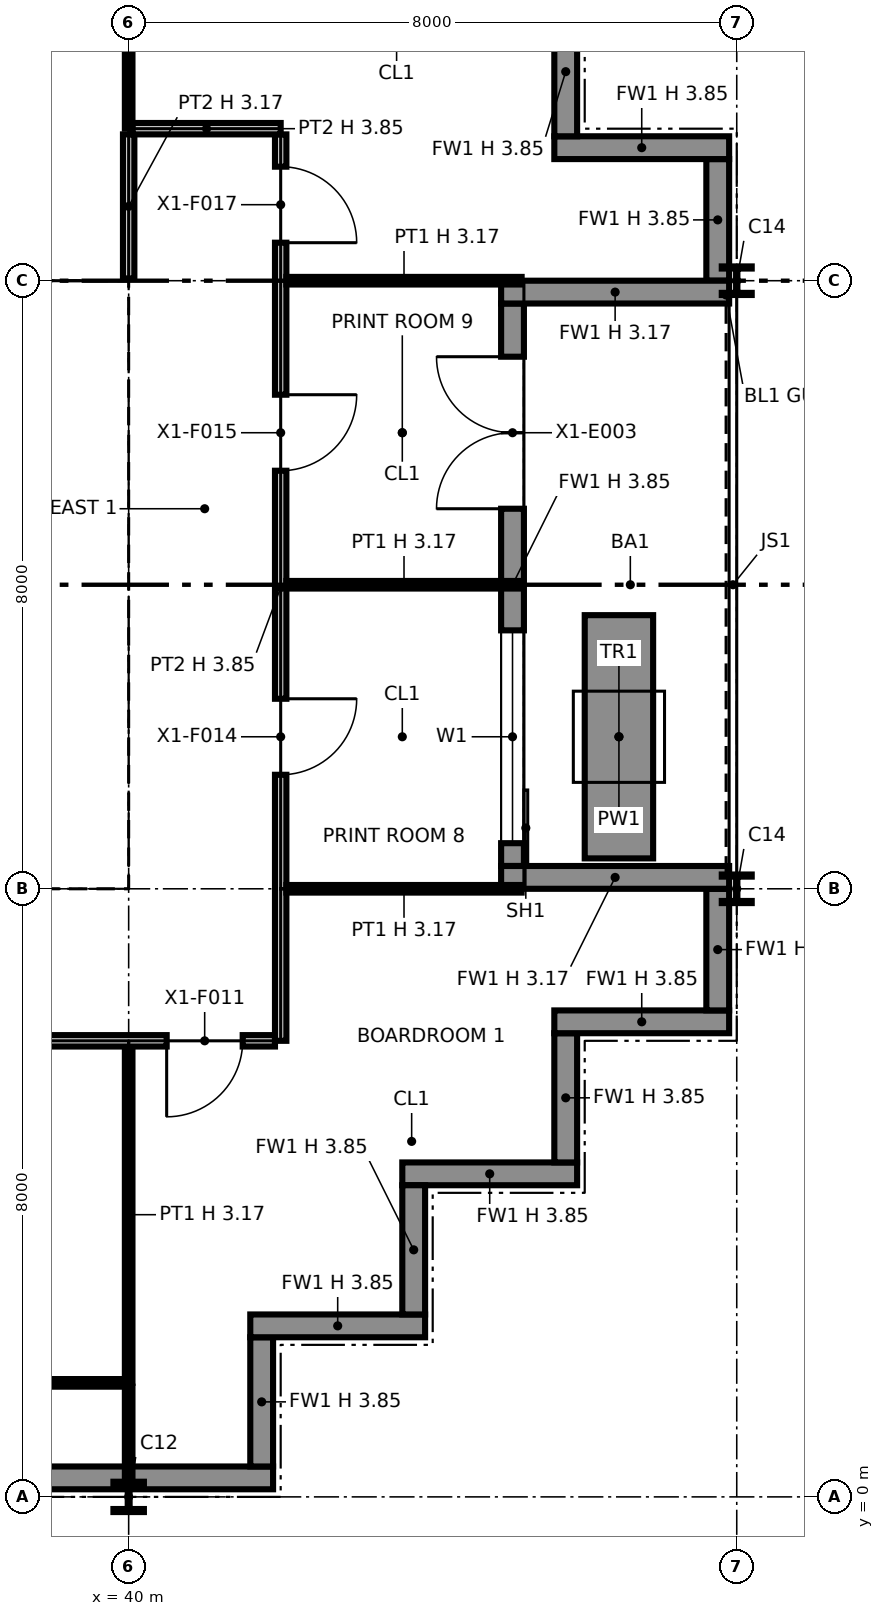
"""IFC4 building model, lengths in metres.
Left out: names, types, materials, properties, quantities, classifications, styles, units other than length and angle.
Written with IfcOpenShell. Run it as: python <this file> out.ifc"""

import sys

from ifc_helpers import new_model, si_unit, direction, frame, frame_2d, origin, origin_2d, place, context, subcontext, project, spatial, polyline, rectangle, i_section, outline, extrude, element, fill, save


model = new_model("IFC4")
c1 = context("Model", 3, precision=1e-05, world=origin(), true_north=direction((0.0, 1.0)))
c2 = subcontext(c1, "Body", "Model", "MODEL_VIEW")
j1 = project(units=[si_unit("LENGTHUNIT", "METRE"), si_unit("PLANEANGLEUNIT", "RADIAN")], contexts=[c1])
p1 = place(None, origin())
s1 = spatial("IfcSite", under=j1, at=p1, CompositionType="ELEMENT")
p2 = place(p1, origin())
s2 = spatial("IfcBuilding", under=s1, at=p2, CompositionType="ELEMENT")
p3 = place(p2, frame((0.0, 0.0, 251.0)))
s3 = spatial("IfcBuildingStorey", under=s2, at=p3, CompositionType="ELEMENT", Elevation=251.0)
p4 = place(p3, frame((40.0, 0.0, 0.0), z_axis=(0.0, 0.0, 1.0), x_axis=(1.0, 0.0, 0.0)))
e1 = element("IfcColumn", 1, at=p4, inside=s3, PredefinedType="COLUMN", context=c2, shape_type="SweptSolid", body=[
    extrude(i_section(OverallWidth=0.401, OverallDepth=0.399, WebThickness=0.025, FlangeThickness=0.04, at=origin_2d()), origin(), (0.0, 0.0, 1.0), 3.85),
])
for number, where, z_axis, x_axis in (
    (2, (40.0, 8.0, 0.0), (0.0, 0.0, 1.0), (1.0, 0.0, 0.0)),
    (3, (40.0, 16.0, 0.0), (0.0, 0.0, 1.0), (1.0, 0.0, 0.0)),
):
    element("IfcColumn", number, at=place(p3, frame(where, z_axis=z_axis, x_axis=x_axis)), inside=s3, PredefinedType="COLUMN", context=c2, shape_type="SweptSolid", body=[
        extrude(i_section(OverallWidth=0.371, OverallDepth=0.361, WebThickness=0.012, FlangeThickness=0.02, at=origin_2d()), origin(), (0.0, 0.0, 1.0), 3.85),
    ])
for number, where, z_axis, x_axis in (
    (4, (48.0, 8.0, 0.0), (0.0, 0.0, 1.0), (1.0, 0.0, 0.0)),
    (5, (48.0, 16.0, 0.0), (0.0, 0.0, 1.0), (1.0, 0.0, 0.0)),
):
    element("IfcColumn", number, at=place(p3, frame(where, z_axis=z_axis, x_axis=x_axis)), inside=s3, PredefinedType="COLUMN", context=c2, shape_type="SweptSolid", body=[
        extrude(i_section(OverallWidth=0.394, OverallDepth=0.376, WebThickness=0.017, FlangeThickness=0.028, at=origin_2d()), origin(), (0.0, 0.0, 1.0), 3.85),
    ])
p5 = place(p3, frame((32.0, 0.25, 0.0), z_axis=(0.0, 0.0, 1.0), x_axis=(1.0, 0.0, 0.0)))
e6 = element("IfcWall", 6, at=p5, inside=s3, PredefinedType="SOLIDWALL", context=c2, shape_type="SweptSolid", body=[
    extrude(rectangle(XDim=9.9, YDim=0.3, at=frame_2d((4.95, 0.0))), origin(), (0.0, 0.0, 1.0), 3.85),
])
p6 = place(p3, frame((41.75, 0.4, 0.0), z_axis=(0.0, 0.0, 1.0), x_axis=(0.0, 1.0, 0.0)))
e7 = element("IfcWall", 7, at=p6, inside=s3, PredefinedType="SOLIDWALL", context=c2, shape_type="SweptSolid", body=[
    extrude(rectangle(XDim=1.7, YDim=0.3, at=frame_2d((0.85, 0.0))), origin(), (0.0, 0.0, 1.0), 3.85),
])
p7 = place(p3, frame((41.6, 2.25, 0.0), z_axis=(0.0, 0.0, 1.0), x_axis=(1.0, 0.0, 0.0)))
e8 = element("IfcWall", 8, at=p7, inside=s3, PredefinedType="SOLIDWALL", context=c2, shape_type="SweptSolid", body=[
    extrude(rectangle(XDim=2.3, YDim=0.3, at=frame_2d((1.15, 0.0))), origin(), (0.0, 0.0, 1.0), 3.85),
])
p8 = place(p3, frame((43.75, 2.4, 0.0), z_axis=(0.0, 0.0, 1.0), x_axis=(0.0, 1.0, 0.0)))
e9 = element("IfcWall", 9, at=p8, inside=s3, PredefinedType="SOLIDWALL", context=c2, shape_type="SweptSolid", body=[
    extrude(rectangle(XDim=1.7, YDim=0.3, at=frame_2d((0.85, 0.0))), origin(), (0.0, 0.0, 1.0), 3.85),
])
p9 = place(p3, frame((43.6, 4.25, 0.0), z_axis=(0.0, 0.0, 1.0), x_axis=(1.0, 0.0, 0.0)))
e10 = element("IfcWall", 10, at=p9, inside=s3, PredefinedType="SOLIDWALL", context=c2, shape_type="SweptSolid", body=[
    extrude(rectangle(XDim=2.3, YDim=0.3, at=frame_2d((1.15, 0.0))), origin(), (0.0, 0.0, 1.0), 3.85),
])
p10 = place(p3, frame((45.75, 4.4, 0.0), z_axis=(0.0, 0.0, 1.0), x_axis=(0.0, 1.0, 0.0)))
e11 = element("IfcWall", 11, at=p10, inside=s3, PredefinedType="SOLIDWALL", context=c2, shape_type="SweptSolid", body=[
    extrude(rectangle(XDim=1.7, YDim=0.3, at=frame_2d((0.85, 0.0))), origin(), (0.0, 0.0, 1.0), 3.85),
])
p11 = place(p3, frame((45.6, 6.25, 0.0), z_axis=(0.0, 0.0, 1.0), x_axis=(1.0, 0.0, 0.0)))
e12 = element("IfcWall", 12, at=p11, inside=s3, PredefinedType="SOLIDWALL", context=c2, shape_type="SweptSolid", body=[
    extrude(rectangle(XDim=2.3, YDim=0.3, at=frame_2d((1.15, 0.0))), origin(), (0.0, 0.0, 1.0), 3.85),
])
p12 = place(p3, frame((47.75, 6.4, 0.0), z_axis=(0.0, 0.0, 1.0), x_axis=(0.0, 1.0, 0.0)))
e13 = element("IfcWall", 13, at=p12, inside=s3, PredefinedType="SOLIDWALL", context=c2, shape_type="SweptSolid", body=[
    extrude(rectangle(XDim=1.6, YDim=0.3, at=frame_2d((0.8, 0.0))), origin(), (0.0, 0.0, 1.0), 3.85),
])
p13 = place(p3, frame((45.05, 8.3, 0.0), z_axis=(0.0, 0.0, 1.0), x_axis=(0.0, 1.0, 0.0)))
e14 = element("IfcWall", 14, at=p13, inside=s3, PredefinedType="SOLIDWALL", context=c2, shape_type="SweptSolid", body=[
    extrude(rectangle(XDim=7.4, YDim=0.3, at=frame_2d((3.7, 0.0))), origin(), (0.0, 0.0, 1.0), 3.85),
])
p14 = place(p13, frame((0.3, 0.0, 0.9)))
e15 = element("IfcOpeningElement", 15, at=p14, cuts=e14, PredefinedType="OPENING", context=c2, shape_type="SweptSolid", body=[
    extrude(rectangle(XDim=2.8, YDim=2.2, at=frame_2d((1.4, 1.1))), frame((0.0, 0.16, 0.0), z_axis=(0.0, -1.0, 0.0), x_axis=(1.0, 0.0, 0.0)), (0.0, 0.0, 1.0), 0.32),
])
p15 = place(p13, frame((4.7, 0.0, 0.0)))
e16 = element("IfcOpeningElement", 16, at=p15, cuts=e14, PredefinedType="OPENING", context=c2, shape_type="SweptSolid", body=[
    extrude(rectangle(XDim=2.0, YDim=2.4, at=frame_2d((1.0, 1.2))), frame((0.0, 0.16, 0.0), z_axis=(0.0, -1.0, 0.0), x_axis=(1.0, 0.0, 0.0)), (0.0, 0.0, 1.0), 0.32),
])
for number, where, z_axis, x_axis in (
    (17, (47.9, 8.15, 0.0), (0.0, 0.0, 1.0), (-1.0, 0.0, 0.0)),
    (18, (47.9, 15.85, 0.0), (0.0, 0.0, 1.0), (-1.0, 0.0, 0.0)),
):
    element("IfcWall", number, at=place(p3, frame(where, z_axis=z_axis, x_axis=x_axis)), inside=s3, PredefinedType="SOLIDWALL", context=c2, shape_type="SweptSolid", body=[
        extrude(rectangle(XDim=3.0, YDim=0.3, at=frame_2d((1.5, 0.0))), origin(), (0.0, 0.0, 1.0), 3.171),
    ])
p16 = place(p3, frame((47.75, 16.0, 0.0), z_axis=(0.0, 0.0, 1.0), x_axis=(0.0, 1.0, 0.0)))
e19 = element("IfcWall", 19, at=p16, inside=s3, PredefinedType="SOLIDWALL", context=c2, shape_type="SweptSolid", body=[
    extrude(rectangle(XDim=1.6, YDim=0.3, at=frame_2d((0.8, 0.0))), origin(), (0.0, 0.0, 1.0), 3.85),
])
p17 = place(p3, frame((46.45, 8.4, 0.0), z_axis=(0.0, 0.0, 1.0), x_axis=(0.0, 1.0, 0.0)))
e20 = element("IfcWall", 20, at=p17, inside=s3, PredefinedType="SOLIDWALL", context=c2, shape_type="SweptSolid", body=[
    extrude(rectangle(XDim=3.2, YDim=0.9, at=frame_2d((1.6, 0.0))), origin(), (0.0, 0.0, 1.0), 0.6),
])
p18 = place(p3, frame((47.9, 17.75, 0.0), z_axis=(0.0, 0.0, 1.0), x_axis=(-1.0, 0.0, 0.0)))
e21 = element("IfcWall", 21, at=p18, inside=s3, PredefinedType="SOLIDWALL", context=c2, shape_type="SweptSolid", body=[
    extrude(rectangle(XDim=2.3, YDim=0.3, at=frame_2d((1.15, 0.0))), origin(), (0.0, 0.0, 1.0), 3.85),
])
p19 = place(p3, frame((45.75, 17.9, 0.0), z_axis=(0.0, 0.0, 1.0), x_axis=(0.0, 1.0, 0.0)))
e22 = element("IfcWall", 22, at=p19, inside=s3, PredefinedType="SOLIDWALL", context=c2, shape_type="SweptSolid", body=[
    extrude(rectangle(XDim=1.7, YDim=0.3, at=frame_2d((0.85, 0.0))), origin(), (0.0, 0.0, 1.0), 3.85),
])
p20 = place(p3, frame((24.65, 8.75, 0.0), z_axis=(0.0, 0.0, 1.0), x_axis=(1.0, 0.0, 0.0)))
e23 = element("IfcWall", 23, at=p20, inside=s3, PredefinedType="PARTITIONING", context=c2, shape_type="SweptSolid", body=[
    extrude(outline(polyline([(0.0, 0.0), (14.7, 0.0), (14.7, 3.85), (7.438, 3.85), (7.438, 3.308), (7.262, 3.308), (7.261, 3.85), (0.0, 3.85), (0.0, 0.0)])), frame((0.0, 0.1, 0.0), z_axis=(0.0, -1.0, 0.0), x_axis=(1.0, 0.0, 0.0)), (0.0, 0.0, 1.0), 0.2),
])
p21 = place(p3, frame((24.65, 15.25, 0.0), z_axis=(0.0, 0.0, 1.0), x_axis=(1.0, 0.0, 0.0)))
e24 = element("IfcWall", 24, at=p21, inside=s3, PredefinedType="PARTITIONING", context=c2, shape_type="SweptSolid", body=[
    extrude(outline(polyline([(0.0, 0.0), (14.7, 0.0), (14.7, 3.85), (7.438, 3.85), (7.438, 3.308), (7.262, 3.308), (7.261, 3.85), (0.0, 3.85), (0.0, 0.0)])), frame((0.0, 0.1, 0.0), z_axis=(0.0, -1.0, 0.0), x_axis=(1.0, 0.0, 0.0)), (0.0, 0.0, 1.0), 0.2),
])
p22 = place(p21, frame((2.85, 0.0, 0.0)))
e25 = element("IfcOpeningElement", 25, at=p22, cuts=e24, PredefinedType="OPENING", context=c2, shape_type="SweptSolid", body=[
    extrude(rectangle(XDim=1.8, YDim=2.1, at=frame_2d((0.9, 1.05))), frame((0.0, 0.11, 0.0), z_axis=(0.0, -1.0, 0.0), x_axis=(1.0, 0.0, 0.0)), (0.0, 0.0, 1.0), 0.22),
])
p23 = place(p21, frame((9.95, 0.0, 0.0), z_axis=(0.0, 0.0, 1.0), x_axis=(-1.0, 0.0, 0.0)))
e26 = element("IfcOpeningElement", 26, at=p23, cuts=e24, PredefinedType="OPENING", context=c2, shape_type="SweptSolid", body=[
    extrude(rectangle(XDim=1.4, YDim=2.1, at=frame_2d((0.7, 1.05))), frame((0.0, 0.11, 0.0), z_axis=(0.0, -1.0, 0.0), x_axis=(1.0, 0.0, 0.0)), (0.0, 0.0, 1.0), 0.22),
])
p24 = place(p21, frame((13.4, 0.0, 0.0), z_axis=(0.0, 0.0, 1.0), x_axis=(-1.0, 0.0, 0.0)))
e27 = element("IfcOpeningElement", 27, at=p24, cuts=e24, PredefinedType="OPENING", context=c2, shape_type="SweptSolid", body=[
    extrude(rectangle(XDim=1.4, YDim=2.1, at=frame_2d((0.7, 1.05))), frame((0.0, 0.11, 0.0), z_axis=(0.0, -1.0, 0.0), x_axis=(1.0, 0.0, 0.0)), (0.0, 0.0, 1.0), 0.22),
])
p25 = place(p3, frame((39.25, 8.85, 0.0), z_axis=(0.0, 0.0, 1.0), x_axis=(0.0, 1.0, 0.0)))
e28 = element("IfcWall", 28, at=p25, inside=s3, PredefinedType="PARTITIONING", context=c2, shape_type="SweptSolid", body=[
    extrude(rectangle(XDim=6.3, YDim=0.2, at=frame_2d((3.15, 0.0))), origin(), (0.0, 0.0, 1.0), 3.85),
])
p26 = place(p3, frame((40.0, 0.13, 0.0), z_axis=(0.0, 0.0, 1.0), x_axis=(0.0, 1.0, 0.0)))
e29 = element("IfcWall", 29, at=p26, inside=s3, PredefinedType="PARTITIONING", context=c2, shape_type="SweptSolid", body=[
    extrude(rectangle(XDim=1.32, YDim=0.1, at=frame_2d((0.66, 0.0))), origin(), (0.0, 0.0, 1.0), 3.172),
])
p27 = place(p3, frame((32.03, 1.5, 0.0), z_axis=(0.0, 0.0, 1.0), x_axis=(1.0, 0.0, 0.0)))
e30 = element("IfcWall", 30, at=p27, inside=s3, PredefinedType="PARTITIONING", context=c2, shape_type="SweptSolid", body=[
    extrude(rectangle(XDim=7.92, YDim=0.1, at=frame_2d((3.96, 0.0))), origin(), (0.0, 0.0, 1.0), 3.85),
])
p28 = place(p27, frame((4.47, 0.0, 0.0), z_axis=(0.0, 0.0, 1.0), x_axis=(-1.0, 0.0, 0.0)))
e31 = element("IfcOpeningElement", 31, at=p28, cuts=e30, PredefinedType="OPENING", context=c2, shape_type="SweptSolid", body=[
    extrude(rectangle(XDim=1.0, YDim=2.1, at=frame_2d((0.5, 1.05))), frame((0.0, 0.06, 0.0), z_axis=(0.0, -1.0, 0.0), x_axis=(1.0, 0.0, 0.0)), (0.0, 0.0, 1.0), 0.12),
])
p29 = place(p3, frame((40.0, 1.5, 0.0), z_axis=(0.0, 0.0, 1.0), x_axis=(0.0, 1.0, 0.0)))
e32 = element("IfcWall", 32, at=p29, inside=s3, PredefinedType="PARTITIONING", context=c2, shape_type="SweptSolid", body=[
    extrude(rectangle(XDim=4.425, YDim=0.1, at=frame_2d((2.212, 0.0))), origin(), (0.0, 0.0, 1.0), 3.172),
])
p30 = place(p3, frame((6.075, 6.0, 0.0), z_axis=(0.0, 0.0, 1.0), x_axis=(1.0, 0.0, 0.0)))
e33 = element("IfcWall", 33, at=p30, inside=s3, PredefinedType="PARTITIONING", context=c2, shape_type="SweptSolid", body=[
    extrude(rectangle(XDim=35.85, YDim=0.15, at=frame_2d((17.925, 0.0))), origin(), (0.0, 0.0, 1.0), 3.85),
])
p31 = place(p30, frame((14.425, 0.0, 0.0), z_axis=(0.0, 0.0, 1.0), x_axis=(-1.0, 0.0, 0.0)))
e34 = element("IfcOpeningElement", 34, at=p31, cuts=e33, PredefinedType="OPENING", context=c2, shape_type="SweptSolid", body=[
    extrude(rectangle(XDim=1.0, YDim=2.1, at=frame_2d((0.5, 1.05))), frame((0.0, 0.085, 0.0), z_axis=(0.0, -1.0, 0.0), x_axis=(1.0, 0.0, 0.0)), (0.0, 0.0, 1.0), 0.17),
])
p32 = place(p30, frame((30.425, 0.0, 0.0), z_axis=(0.0, 0.0, 1.0), x_axis=(-1.0, 0.0, 0.0)))
e35 = element("IfcOpeningElement", 35, at=p32, cuts=e33, PredefinedType="OPENING", context=c2, shape_type="SweptSolid", body=[
    extrude(rectangle(XDim=1.0, YDim=2.1, at=frame_2d((0.5, 1.05))), frame((0.0, 0.085, 0.0), z_axis=(0.0, -1.0, 0.0), x_axis=(1.0, 0.0, 0.0)), (0.0, 0.0, 1.0), 0.17),
])
p33 = place(p30, frame((4.425, 0.0, 0.0), z_axis=(0.0, 0.0, 1.0), x_axis=(-1.0, 0.0, 0.0)))
e36 = element("IfcOpeningElement", 36, at=p33, cuts=e33, PredefinedType="OPENING", context=c2, shape_type="SweptSolid", body=[
    extrude(rectangle(XDim=1.0, YDim=2.1, at=frame_2d((0.5, 1.05))), frame((0.0, 0.085, 0.0), z_axis=(0.0, -1.0, 0.0), x_axis=(1.0, 0.0, 0.0)), (0.0, 0.0, 1.0), 0.17),
])
p34 = place(p30, frame((8.425, 0.0, 0.0), z_axis=(0.0, 0.0, 1.0), x_axis=(-1.0, 0.0, 0.0)))
e37 = element("IfcOpeningElement", 37, at=p34, cuts=e33, PredefinedType="OPENING", context=c2, shape_type="SweptSolid", body=[
    extrude(rectangle(XDim=1.0, YDim=2.1, at=frame_2d((0.5, 1.05))), frame((0.0, 0.085, 0.0), z_axis=(0.0, -1.0, 0.0), x_axis=(1.0, 0.0, 0.0)), (0.0, 0.0, 1.0), 0.17),
])
p35 = place(p30, frame((19.425, 0.0, 0.0), z_axis=(0.0, 0.0, 1.0), x_axis=(-1.0, 0.0, 0.0)))
e38 = element("IfcOpeningElement", 38, at=p35, cuts=e33, PredefinedType="OPENING", context=c2, shape_type="SweptSolid", body=[
    extrude(rectangle(XDim=1.0, YDim=2.1, at=frame_2d((0.5, 1.05))), frame((0.0, 0.085, 0.0), z_axis=(0.0, -1.0, 0.0), x_axis=(1.0, 0.0, 0.0)), (0.0, 0.0, 1.0), 0.17),
])
p36 = place(p30, frame((24.425, 0.0, 0.0), z_axis=(0.0, 0.0, 1.0), x_axis=(-1.0, 0.0, 0.0)))
e39 = element("IfcOpeningElement", 39, at=p36, cuts=e33, PredefinedType="OPENING", context=c2, shape_type="SweptSolid", body=[
    extrude(rectangle(XDim=1.0, YDim=2.1, at=frame_2d((0.5, 1.05))), frame((0.0, 0.085, 0.0), z_axis=(0.0, -1.0, 0.0), x_axis=(1.0, 0.0, 0.0)), (0.0, 0.0, 1.0), 0.17),
])
p37 = place(p30, frame((35.425, 0.0, 0.0), z_axis=(0.0, 0.0, 1.0), x_axis=(-1.0, 0.0, 0.0)))
e40 = element("IfcOpeningElement", 40, at=p37, cuts=e33, PredefinedType="OPENING", context=c2, shape_type="SweptSolid", body=[
    extrude(rectangle(XDim=1.0, YDim=2.1, at=frame_2d((0.5, 1.05))), frame((0.0, 0.085, 0.0), z_axis=(0.0, -1.0, 0.0), x_axis=(1.0, 0.0, 0.0)), (0.0, 0.0, 1.0), 0.17),
])
p38 = place(p3, frame((42.0, 6.0, 0.0), z_axis=(0.0, 0.0, 1.0), x_axis=(0.0, 1.0, 0.0)))
e41 = element("IfcWall", 41, at=p38, inside=s3, PredefinedType="PARTITIONING", context=c2, shape_type="SweptSolid", body=[
    extrude(outline(polyline([(0.0, 0.0), (11.925, 0.0), (11.925, 3.85), (10.3, 3.85), (10.298, 3.172), (9.702, 3.172), (9.7, 3.85), (6.3, 3.85), (6.298, 3.172), (5.702, 3.172), (5.7, 3.85), (2.3, 3.85), (2.298, 3.172), (1.702, 3.172), (1.7, 3.85), (0.0, 3.85), (0.0, 0.0)])), frame((0.0, 0.075, 0.0), z_axis=(0.0, -1.0, 0.0), x_axis=(1.0, 0.0, 0.0)), (0.0, 0.0, 1.0), 0.15),
])
p39 = place(p38, frame((4.5, 0.0, 0.0), z_axis=(0.0, 0.0, 1.0), x_axis=(-1.0, 0.0, 0.0)))
e42 = element("IfcOpeningElement", 42, at=p39, cuts=e41, PredefinedType="OPENING", context=c2, shape_type="SweptSolid", body=[
    extrude(rectangle(XDim=1.0, YDim=2.1, at=frame_2d((0.5, 1.05))), frame((0.0, 0.085, 0.0), z_axis=(0.0, -1.0, 0.0), x_axis=(1.0, 0.0, 0.0)), (0.0, 0.0, 1.0), 0.17),
])
p40 = place(p38, frame((8.5, 0.0, 0.0), z_axis=(0.0, 0.0, 1.0), x_axis=(-1.0, 0.0, 0.0)))
e43 = element("IfcOpeningElement", 43, at=p40, cuts=e41, PredefinedType="OPENING", context=c2, shape_type="SweptSolid", body=[
    extrude(rectangle(XDim=1.0, YDim=2.1, at=frame_2d((0.5, 1.05))), frame((0.0, 0.085, 0.0), z_axis=(0.0, -1.0, 0.0), x_axis=(1.0, 0.0, 0.0)), (0.0, 0.0, 1.0), 0.17),
])
p41 = place(p38, frame((11.5, 0.0, 0.0), z_axis=(0.0, 0.0, 1.0), x_axis=(-1.0, 0.0, 0.0)))
e44 = element("IfcOpeningElement", 44, at=p41, cuts=e41, PredefinedType="OPENING", context=c2, shape_type="SweptSolid", body=[
    extrude(rectangle(XDim=1.0, YDim=2.1, at=frame_2d((0.5, 1.05))), frame((0.0, 0.085, 0.0), z_axis=(0.0, -1.0, 0.0), x_axis=(1.0, 0.0, 0.0)), (0.0, 0.0, 1.0), 0.17),
])
for number, where, z_axis, x_axis in (
    (45, (42.075, 8.0, 0.0), (0.0, 0.0, 1.0), (1.0, 0.0, 0.0)),
    (46, (42.075, 12.0, 0.0), (0.0, 0.0, 1.0), (1.0, 0.0, 0.0)),
    (47, (42.075, 16.0, 0.0), (0.0, 0.0, 1.0), (1.0, 0.0, 0.0)),
):
    element("IfcWall", number, at=place(p3, frame(where, z_axis=z_axis, x_axis=x_axis)), inside=s3, PredefinedType="PARTITIONING", context=c2, shape_type="SweptSolid", body=[
        extrude(rectangle(XDim=3.095, YDim=0.1, at=frame_2d((1.547, 0.0))), origin(), (0.0, 0.0, 1.0), 3.172),
    ])
p42 = place(p3, frame((40.0, 16.03, 0.0), z_axis=(0.0, 0.0, 1.0), x_axis=(0.0, 1.0, 0.0)))
e48 = element("IfcWall", 48, at=p42, inside=s3, PredefinedType="PARTITIONING", context=c2, shape_type="SweptSolid", body=[
    extrude(rectangle(XDim=1.895, YDim=0.15, at=frame_2d((0.948, 0.0))), origin(), (0.0, 0.0, 1.0), 3.172),
])
p43 = place(p3, frame((40.05, 18.0, 0.0), z_axis=(0.0, 0.0, 1.0), x_axis=(1.0, 0.0, 0.0)))
e49 = element("IfcWall", 49, at=p43, inside=s3, PredefinedType="PARTITIONING", context=c2, shape_type="SweptSolid", body=[
    extrude(rectangle(XDim=1.95, YDim=0.15, at=frame_2d((0.975, 0.0))), origin(), (0.0, 0.0, 1.0), 3.85),
])
p44 = place(p3, frame((40.0, 18.0, 0.0), z_axis=(0.0, 0.0, 1.0), x_axis=(0.0, 1.0, 0.0)))
e50 = element("IfcWall", 50, at=p44, inside=s3, PredefinedType="PARTITIONING", context=c2, shape_type="SweptSolid", body=[
    extrude(rectangle(XDim=3.17, YDim=0.1, at=frame_2d((1.585, 0.0))), origin(), (0.0, 0.0, 1.0), 3.172),
])
p45 = place(p14, origin())
e51 = element("IfcWindow", 51, at=p45, inside=s3, PartitioningType="SINGLE_PANEL", PredefinedType="WINDOW", context=c2, shape_type="SweptSolid", body=[
    extrude(rectangle(XDim=2.8, YDim=2.2, at=frame_2d((1.4, 1.1))), frame((0.0, 0.03, 0.0), z_axis=(0.0, -1.0, 0.0), x_axis=(1.0, 0.0, 0.0)), (0.0, 0.0, 1.0), 0.06),
])
fill(e15, e51)
p46 = place(p15, origin())
e52 = element("IfcDoor", 52, at=p46, inside=s3, OperationType="DOUBLE_DOOR_SINGLE_SWING", PredefinedType="DOOR", context=c2, shape_type="SweptSolid", body=[
    extrude(rectangle(XDim=2.0, YDim=2.4, at=frame_2d((1.0, 1.2))), frame((0.0, 0.025, 0.0), z_axis=(0.0, -1.0, 0.0), x_axis=(1.0, 0.0, 0.0)), (0.0, 0.0, 1.0), 0.05),
])
fill(e16, e52)
p47 = place(p37, origin())
e53 = element("IfcDoor", 53, at=p47, inside=s3, OperationType="SINGLE_SWING_RIGHT", PredefinedType="DOOR", context=c2, shape_type="SweptSolid", body=[
    extrude(rectangle(XDim=1.0, YDim=2.1, at=frame_2d((0.5, 1.05))), frame((0.0, 0.025, 0.0), z_axis=(0.0, -1.0, 0.0), x_axis=(1.0, 0.0, 0.0)), (0.0, 0.0, 1.0), 0.05),
])
fill(e40, e53)
p48 = place(p39, origin())
e54 = element("IfcDoor", 54, at=p48, inside=s3, OperationType="SINGLE_SWING_LEFT", PredefinedType="DOOR", context=c2, shape_type="SweptSolid", body=[
    extrude(rectangle(XDim=1.0, YDim=2.1, at=frame_2d((0.5, 1.05))), frame((0.0, 0.025, 0.0), z_axis=(0.0, -1.0, 0.0), x_axis=(1.0, 0.0, 0.0)), (0.0, 0.0, 1.0), 0.05),
])
fill(e42, e54)
p49 = place(p40, origin())
e55 = element("IfcDoor", 55, at=p49, inside=s3, OperationType="SINGLE_SWING_LEFT", PredefinedType="DOOR", context=c2, shape_type="SweptSolid", body=[
    extrude(rectangle(XDim=1.0, YDim=2.1, at=frame_2d((0.5, 1.05))), frame((0.0, 0.025, 0.0), z_axis=(0.0, -1.0, 0.0), x_axis=(1.0, 0.0, 0.0)), (0.0, 0.0, 1.0), 0.05),
])
fill(e43, e55)
p50 = place(p41, origin())
e56 = element("IfcDoor", 56, at=p50, inside=s3, OperationType="SINGLE_SWING_RIGHT", PredefinedType="DOOR", context=c2, shape_type="SweptSolid", body=[
    extrude(rectangle(XDim=1.0, YDim=2.1, at=frame_2d((0.5, 1.05))), frame((0.0, 0.025, 0.0), z_axis=(0.0, -1.0, 0.0), x_axis=(1.0, 0.0, 0.0)), (0.0, 0.0, 1.0), 0.05),
])
fill(e44, e56)
save(model, sys.argv[1])
